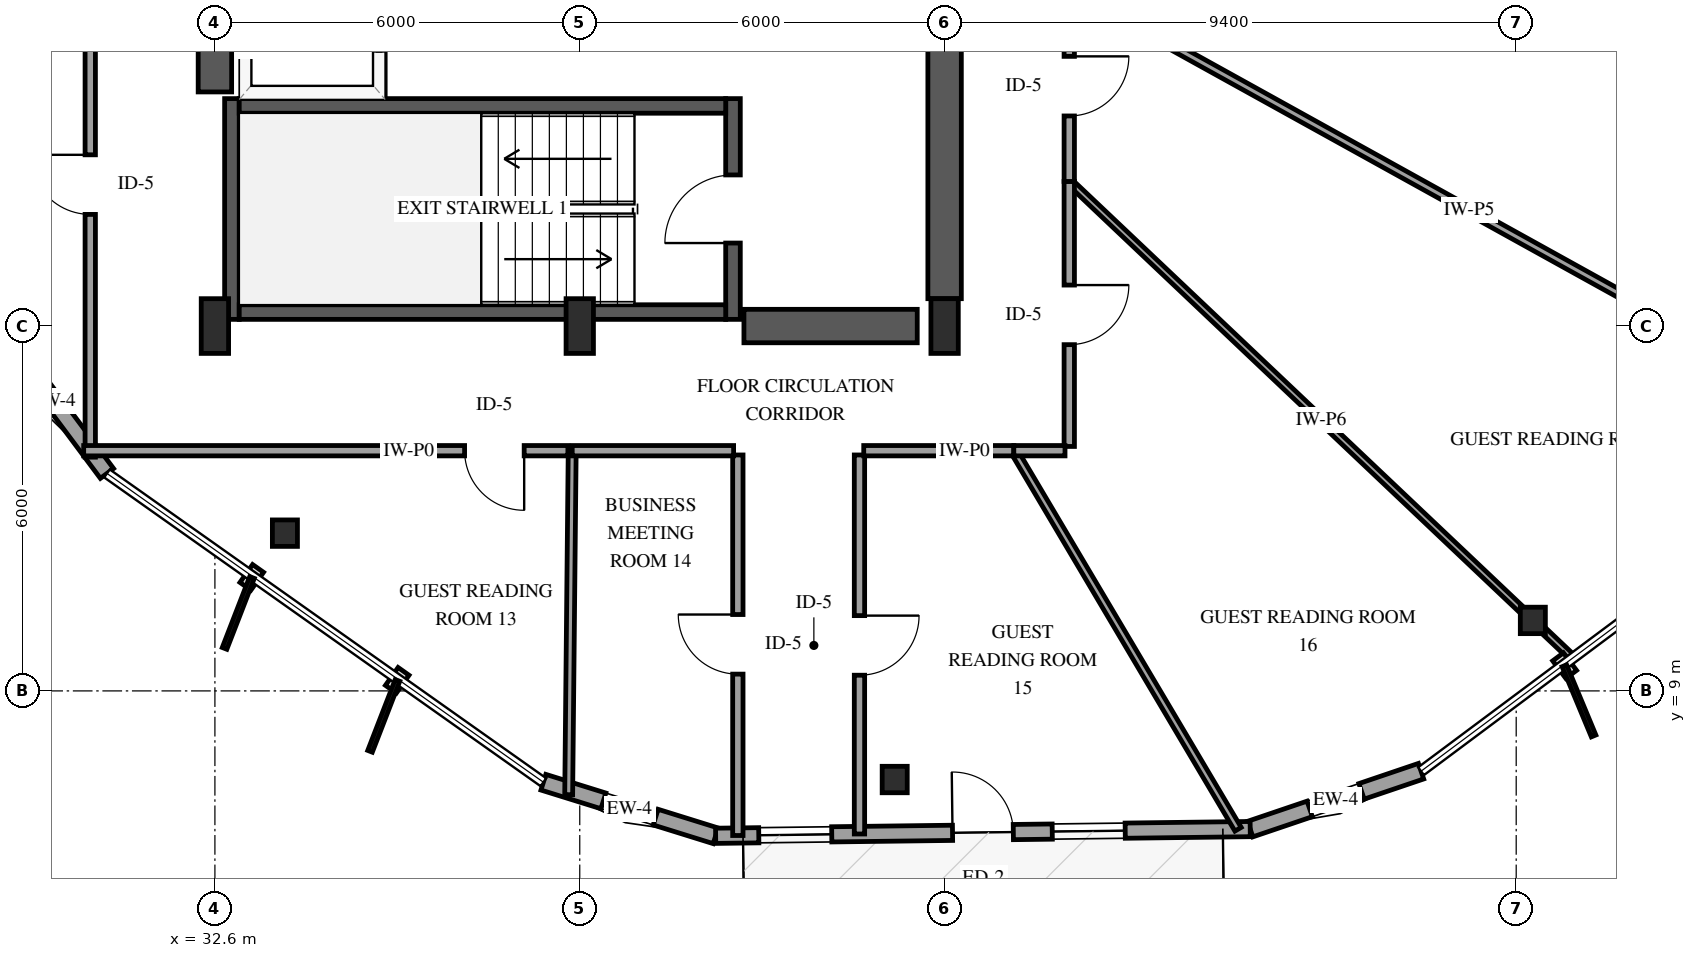
"""IFC4 building model, lengths in metres.
Left out: names, types, materials, properties, quantities, classifications, styles, units other than length and angle.
Written with IfcOpenShell. Run it as: python <this file> out.ifc"""

import sys

from ifc_helpers import new_model, si_unit, direction, frame, frame_2d, origin, origin_2d, place, context, subcontext, project, spatial, rectangle, i_section, extrude, element, fill, save


model = new_model("IFC4")
c1 = context("Model", 3, precision=1e-05, world=origin(), true_north=direction((0.0, 1.0)))
c2 = subcontext(c1, "Body", "Model", "MODEL_VIEW")
j1 = project(units=[si_unit("LENGTHUNIT", "METRE"), si_unit("PLANEANGLEUNIT", "RADIAN")], contexts=[c1])
p1 = place(None, origin())
s1 = spatial("IfcSite", under=j1, at=p1, CompositionType="ELEMENT")
p2 = place(p1, origin())
s2 = spatial("IfcBuilding", under=s1, at=p2, CompositionType="ELEMENT")
p3 = place(p2, frame((0.0, 0.0, 167.8)))
s3 = spatial("IfcBuildingStorey", under=s2, at=p3, CompositionType="ELEMENT", Elevation=167.8)
p4 = place(p3, frame((32.88, 15.11, 0.0), z_axis=(0.0, 0.0, 1.0), x_axis=(0.0, 1.0, 0.0)))
e1 = element("IfcWall", 1, at=p4, inside=s3, PredefinedType="SHEAR", context=c2, shape_type="SweptSolid", body=[
    extrude(rectangle(XDim=3.63, YDim=0.24, at=frame_2d((1.815, 0.0))), origin(), (0.0, 0.0, 1.0), 3.6),
])
p5 = place(p3, frame((41.12, 15.11, 0.0), z_axis=(0.0, 0.0, 1.0), x_axis=(0.0, 1.0, 0.0)))
e2 = element("IfcWall", 2, at=p5, inside=s3, PredefinedType="SHEAR", context=c2, shape_type="SweptSolid", body=[
    extrude(rectangle(XDim=3.63, YDim=0.24, at=frame_2d((1.815, 0.0))), origin(), (0.0, 0.0, 1.0), 3.6),
])
p6 = place(p5, frame((1.255, 0.0, 0.0)))
e3 = element("IfcOpeningElement", 3, at=p6, cuts=e2, PredefinedType="OPENING", context=c2, shape_type="SweptSolid", body=[
    extrude(rectangle(XDim=1.12, YDim=2.15, at=frame_2d((0.56, 1.075))), frame((0.0, 0.13, 0.0), z_axis=(0.0, -1.0, 0.0), x_axis=(1.0, 0.0, 0.0)), (0.0, 0.0, 1.0), 0.26),
])
for number, where, z_axis, x_axis in (
    (4, (33.0, 15.23, 0.0), (0.0, 0.0, 1.0), (1.0, 0.0, 0.0)),
    (5, (33.0, 18.62, 0.0), (0.0, 0.0, 1.0), (1.0, 0.0, 0.0)),
):
    element("IfcWall", number, at=place(p3, frame(where, z_axis=z_axis, x_axis=x_axis)), inside=s3, PredefinedType="SHEAR", context=c2, shape_type="SweptSolid", body=[
        extrude(rectangle(XDim=8.0, YDim=0.24, at=frame_2d((4.0, 0.0))), origin(), (0.0, 0.0, 1.0), 3.6),
    ])
p7 = place(p3, frame((32.6, 18.85, 0.0), z_axis=(0.0, 0.0, 1.0), x_axis=(0.0, 1.0, 0.0)))
e6 = element("IfcWall", 6, at=p7, inside=s3, PredefinedType="SHEAR", context=c2, shape_type="SweptSolid", body=[
    extrude(rectangle(XDim=12.3, YDim=0.55, at=frame_2d((6.15, 0.0))), origin(), (0.0, 0.0, 1.0), 3.6),
])
p8 = place(p3, frame((41.3, 15.0, 0.0), z_axis=(0.0, 0.0, 1.0), x_axis=(1.0, 0.0, 0.0)))
e7 = element("IfcWall", 7, at=p8, inside=s3, PredefinedType="SHEAR", context=c2, shape_type="SweptSolid", body=[
    extrude(rectangle(XDim=2.85, YDim=0.55, at=frame_2d((1.425, 0.0))), origin(), (0.0, 0.0, 1.0), 3.6),
])
p9 = place(p3, frame((44.6, 15.45, 0.0), z_axis=(0.0, 0.0, 1.0), x_axis=(0.0, 1.0, 0.0)))
e8 = element("IfcWall", 8, at=p9, inside=s3, PredefinedType="SHEAR", context=c2, shape_type="SweptSolid", body=[
    extrude(rectangle(XDim=6.35, YDim=0.55, at=frame_2d((3.175, 0.0))), origin(), (0.0, 0.0, 1.0), 3.6),
])
for number, where, z_axis, x_axis in (
    (9, (32.6, 15.0, 0.0), (0.0, 0.0, 1.0), (1.0, 0.0, 0.0)),
    (10, (38.6, 15.0, 0.0), (0.0, 0.0, 1.0), (1.0, 0.0, 0.0)),
    (11, (44.6, 15.0, 0.0), (0.0, 0.0, 1.0), (1.0, 0.0, 0.0)),
):
    element("IfcColumn", number, at=place(p3, frame(where, z_axis=z_axis, x_axis=x_axis)), inside=s3, PredefinedType="PILASTER", context=c2, shape_type="SweptSolid", body=[
        extrude(rectangle(XDim=0.45, YDim=0.9, at=origin_2d()), origin(), (0.0, 0.0, 1.0), 3.6),
    ])
for number, where, z_axis, x_axis in (
    (12, (33.751, 11.594, 0.0), (0.0, 0.0, 1.0), (1.0, 0.0, 0.0)),
    (13, (43.779, 7.542, 0.0), (0.0, 0.0, 1.0), (1.0, 0.0, 0.0)),
    (14, (54.274, 10.159, 0.0), (0.0, 0.0, 1.0), (1.0, 0.0, 0.0)),
):
    element("IfcColumn", number, at=place(p3, frame(where, z_axis=z_axis, x_axis=x_axis)), inside=s3, PredefinedType="COLUMN", context=c2, shape_type="SweptSolid", body=[
        extrude(i_section(OverallWidth=0.412, OverallDepth=0.435, WebThickness=0.036, FlangeThickness=0.057, FilletRadius=0.038, at=origin_2d()), origin(), (0.0, 0.0, 1.0), 3.6),
    ])
p10 = place(p3, frame((29.052, 14.954, 0.0), z_axis=(0.0, 0.0, 1.0), x_axis=(0.597891104192, -0.80157733721, 0.0)))
e15 = element("IfcWall", 15, at=p10, inside=s3, PredefinedType="SOLIDWALL", context=c2, shape_type="SweptSolid", body=[
    extrude(rectangle(XDim=2.967, YDim=0.27, at=frame_2d((1.483, 0.0))), origin(), (0.0, 0.0, 1.0), 2.679),
])
p11 = place(p3, frame((38.002, 7.498, 0.0), z_axis=(0.0, 0.0, 1.0), x_axis=(0.954868707694, -0.29702819911, 0.0)))
e16 = element("IfcWall", 16, at=p11, inside=s3, PredefinedType="SOLIDWALL", context=c2, shape_type="SweptSolid", body=[
    extrude(rectangle(XDim=2.966, YDim=0.27, at=frame_2d((1.483, 0.0))), origin(), (0.0, 0.0, 1.0), 2.679),
])
p12 = place(p11, frame((1.033, 0.0, 0.75)))
e17 = element("IfcOpeningElement", 17, at=p12, cuts=e16, PredefinedType="OPENING", context=c2, shape_type="SweptSolid", body=[
    extrude(rectangle(XDim=0.9, YDim=1.5, at=frame_2d((0.45, 0.75))), frame((0.0, 0.145, 0.0), z_axis=(0.0, -1.0, 0.0), x_axis=(1.0, 0.0, 0.0)), (0.0, 0.0, 1.0), 0.29),
])
p13 = place(p3, frame((49.626, 6.728, 0.0), z_axis=(0.0, 0.0, 1.0), x_axis=(0.947099800271, 0.320939197242, 0.0)))
e18 = element("IfcWall", 18, at=p13, inside=s3, PredefinedType="SOLIDWALL", context=c2, shape_type="SweptSolid", body=[
    extrude(rectangle(XDim=2.967, YDim=0.27, at=frame_2d((1.483, 0.0))), origin(), (0.0, 0.0, 1.0), 2.679),
])
p14 = place(p13, frame((1.033, 0.0, 0.75)))
e19 = element("IfcOpeningElement", 19, at=p14, cuts=e18, PredefinedType="OPENING", context=c2, shape_type="SweptSolid", body=[
    extrude(rectangle(XDim=0.9, YDim=1.5, at=frame_2d((0.45, 0.75))), frame((0.0, 0.145, 0.0), z_axis=(0.0, -1.0, 0.0), x_axis=(1.0, 0.0, 0.0)), (0.0, 0.0, 1.0), 0.29),
])
p15 = place(p3, frame((40.835, 6.617, 0.0), z_axis=(0.0, 0.0, 1.0), x_axis=(0.999921223342, 0.012551777187, 0.0)))
e20 = element("IfcWall", 20, at=p15, inside=s3, PredefinedType="SOLIDWALL", context=c2, shape_type="SweptSolid", body=[
    extrude(rectangle(XDim=8.792, YDim=0.25, at=frame_2d((4.396, 0.0))), origin(), (0.0, 0.0, 1.0), 2.679),
])
p16 = place(p15, frame((3.896, 0.0, 0.0)))
e21 = element("IfcOpeningElement", 21, at=p16, cuts=e20, PredefinedType="OPENING", context=c2, shape_type="SweptSolid", body=[
    extrude(rectangle(XDim=1.0, YDim=2.15, at=frame_2d((0.5, 1.075))), frame((0.0, 0.135, 0.0), z_axis=(0.0, -1.0, 0.0), x_axis=(1.0, 0.0, 0.0)), (0.0, 0.0, 1.0), 0.27),
])
p17 = place(p15, frame((0.709, 0.0, 0.72)))
e22 = element("IfcOpeningElement", 22, at=p17, cuts=e20, PredefinedType="OPENING", context=c2, shape_type="SweptSolid", body=[
    extrude(rectangle(XDim=1.2, YDim=1.6, at=frame_2d((0.6, 0.8))), frame((0.0, 0.135, 0.0), z_axis=(0.0, -1.0, 0.0), x_axis=(1.0, 0.0, 0.0)), (0.0, 0.0, 1.0), 0.27),
])
p18 = place(p15, frame((5.536, 0.0, 0.72)))
e23 = element("IfcOpeningElement", 23, at=p18, cuts=e20, PredefinedType="OPENING", context=c2, shape_type="SweptSolid", body=[
    extrude(rectangle(XDim=1.2, YDim=1.6, at=frame_2d((0.6, 0.8))), frame((0.0, 0.135, 0.0), z_axis=(0.0, -1.0, 0.0), x_axis=(1.0, 0.0, 0.0)), (0.0, 0.0, 1.0), 0.27),
])
p19 = place(p3, frame((35.3, 18.79, 0.0), z_axis=(0.0, 0.0, 1.0), x_axis=(0.0, 1.0, 0.0)))
e24 = element("IfcWall", 24, at=p19, inside=s3, PredefinedType="SOLIDWALL", context=c2, shape_type="SweptSolid", body=[
    extrude(rectangle(XDim=2.55, YDim=0.2, at=frame_2d((1.275, 0.0))), origin(), (0.0, 0.0, 1.0), 3.3),
])
p20 = place(p19, frame((0.725, 0.0, 0.0)))
e25 = element("IfcOpeningElement", 25, at=p20, cuts=e24, PredefinedType="OPENING", context=c2, shape_type="SweptSolid", body=[
    extrude(rectangle(XDim=1.1, YDim=2.15, at=frame_2d((0.55, 1.075))), frame((0.0, 0.11, 0.0), z_axis=(0.0, -1.0, 0.0), x_axis=(1.0, 0.0, 0.0)), (0.0, 0.0, 1.0), 0.22),
])
p21 = place(p3, frame((46.65, 22.668, 0.0), z_axis=(0.0, 0.0, 1.0), x_axis=(0.960487742443, -0.278322289113, 0.0)))
e26 = element("IfcWall", 26, at=p21, inside=s3, PredefinedType="PARTITIONING", context=c2, shape_type="SweptSolid", body=[
    extrude(rectangle(XDim=16.064, YDim=0.1, at=frame_2d((8.032, 0.0))), origin(), (0.0, 0.0, 1.0), 3.3),
])
p22 = place(p3, frame((46.65, 20.542, 0.0), z_axis=(0.0, 0.0, 1.0), x_axis=(0.87479400399, -0.484495047016, 0.0)))
e27 = element("IfcWall", 27, at=p22, inside=s3, PredefinedType="PARTITIONING", context=c2, shape_type="SweptSolid", body=[
    extrude(rectangle(XDim=15.03, YDim=0.13, at=frame_2d((7.515, 0.0))), origin(), (0.0, 0.0, 1.0), 3.3),
])
p23 = place(p3, frame((46.65, 17.378, 0.0), z_axis=(0.0, 0.0, 1.0), x_axis=(0.726147344165, -0.687539114932, 0.0)))
e28 = element("IfcWall", 28, at=p23, inside=s3, PredefinedType="PARTITIONING", context=c2, shape_type="SweptSolid", body=[
    extrude(rectangle(XDim=11.401, YDim=0.11, at=frame_2d((5.701, 0.0))), origin(), (0.0, 0.0, 1.0), 2.595),
])
p24 = place(p3, frame((30.55, 12.844, 0.0), z_axis=(0.0, 0.0, 1.0), x_axis=(0.0, 1.0, 0.0)))
e29 = element("IfcWall", 29, at=p24, inside=s3, PredefinedType="PARTITIONING", context=c2, shape_type="SweptSolid", body=[
    extrude(rectangle(XDim=8.934, YDim=0.17, at=frame_2d((4.467, 0.0))), origin(), (0.0, 0.0, 1.0), 3.3),
])
p25 = place(p24, frame((3.992, 0.0, 0.0)))
e30 = element("IfcOpeningElement", 30, at=p25, cuts=e29, PredefinedType="OPENING", context=c2, shape_type="SweptSolid", body=[
    extrude(rectangle(XDim=0.98, YDim=2.15, at=frame_2d((0.49, 1.075))), frame((0.0, 0.095, 0.0), z_axis=(0.0, -1.0, 0.0), x_axis=(1.0, 0.0, 0.0)), (0.0, 0.0, 1.0), 0.19),
])
p26 = place(p3, frame((38.405, 12.95, 0.0), z_axis=(0.0, 0.0, 1.0), x_axis=(-1.0, 0.0, 0.0)))
e31 = element("IfcWall", 31, at=p26, inside=s3, PredefinedType="PARTITIONING", context=c2, shape_type="SweptSolid", body=[
    extrude(rectangle(XDim=7.963, YDim=0.17, at=frame_2d((3.981, 0.0))), origin(), (0.0, 0.0, 1.0), 3.3),
])
p27 = place(p26, frame((0.719, 0.0, 0.0)))
e32 = element("IfcOpeningElement", 32, at=p27, cuts=e31, PredefinedType="OPENING", context=c2, shape_type="SweptSolid", body=[
    extrude(rectangle(XDim=0.98, YDim=2.15, at=frame_2d((0.49, 1.075))), frame((0.0, 0.095, 0.0), z_axis=(0.0, -1.0, 0.0), x_axis=(1.0, 0.0, 0.0)), (0.0, 0.0, 1.0), 0.19),
])
p28 = place(p3, frame((45.738, 12.95, 0.0), z_axis=(0.0, 0.0, 1.0), x_axis=(0.50971914419, -0.860340859222, 0.0)))
e33 = element("IfcWall", 33, at=p28, inside=s3, PredefinedType="PARTITIONING", context=c2, shape_type="SweptSolid", body=[
    extrude(rectangle(XDim=7.235, YDim=0.12, at=frame_2d((3.618, 0.0))), origin(), (0.0, 0.0, 1.0), 2.678),
])
p29 = place(p3, frame((41.2, 6.622, 0.0), z_axis=(0.0, 0.0, 1.0), x_axis=(0.0, 1.0, 0.0)))
e34 = element("IfcWall", 34, at=p29, inside=s3, PredefinedType="PARTITIONING", context=c2, shape_type="SweptSolid", body=[
    extrude(rectangle(XDim=6.258, YDim=0.17, at=frame_2d((3.129, 0.0))), origin(), (0.0, 0.0, 1.0), 3.3),
])
p30 = place(p29, frame((2.654, 0.0, 0.0)))
e35 = element("IfcOpeningElement", 35, at=p30, cuts=e34, PredefinedType="OPENING", context=c2, shape_type="SweptSolid", body=[
    extrude(rectangle(XDim=0.98, YDim=2.15, at=frame_2d((0.49, 1.075))), frame((0.0, 0.095, 0.0), z_axis=(0.0, -1.0, 0.0), x_axis=(1.0, 0.0, 0.0)), (0.0, 0.0, 1.0), 0.19),
])
p31 = place(p3, frame((43.2, 12.88, 0.0), z_axis=(0.0, 0.0, 1.0), x_axis=(0.0, -1.0, 0.0)))
e36 = element("IfcWall", 36, at=p31, inside=s3, PredefinedType="PARTITIONING", context=c2, shape_type="SweptSolid", body=[
    extrude(rectangle(XDim=6.233, YDim=0.17, at=frame_2d((3.116, 0.0))), origin(), (0.0, 0.0, 1.0), 2.595),
])
p32 = place(p31, frame((2.642, 0.0, 0.0)))
e37 = element("IfcOpeningElement", 37, at=p32, cuts=e36, PredefinedType="OPENING", context=c2, shape_type="SweptSolid", body=[
    extrude(rectangle(XDim=0.98, YDim=2.15, at=frame_2d((0.49, 1.075))), frame((0.0, 0.095, 0.0), z_axis=(0.0, -1.0, 0.0), x_axis=(1.0, 0.0, 0.0)), (0.0, 0.0, 1.0), 0.19),
])
p33 = place(p3, frame((38.475, 12.879, 0.0), z_axis=(0.0, 0.0, 1.0), x_axis=(-0.010226737898, -0.999947705549, 0.0)))
e38 = element("IfcWall", 38, at=p33, inside=s3, PredefinedType="PARTITIONING", context=c2, shape_type="SweptSolid", body=[
    extrude(rectangle(XDim=5.586, YDim=0.13, at=frame_2d((2.793, 0.0))), origin(), (0.0, 0.0, 1.0), 2.678),
])
p34 = place(p3, frame((46.65, 17.378, 0.0), z_axis=(0.0, 0.0, 1.0), x_axis=(0.0, -1.0, 0.0)))
e39 = element("IfcWall", 39, at=p34, inside=s3, PredefinedType="PARTITIONING", context=c2, shape_type="SweptSolid", body=[
    extrude(rectangle(XDim=4.358, YDim=0.17, at=frame_2d((2.179, 0.0))), origin(), (0.0, 0.0, 1.0), 3.3),
])
p35 = place(p34, frame((1.704, 0.0, 0.0)))
e40 = element("IfcOpeningElement", 40, at=p35, cuts=e39, PredefinedType="OPENING", context=c2, shape_type="SweptSolid", body=[
    extrude(rectangle(XDim=0.98, YDim=2.15, at=frame_2d((0.49, 1.075))), frame((0.0, 0.095, 0.0), z_axis=(0.0, -1.0, 0.0), x_axis=(1.0, 0.0, 0.0)), (0.0, 0.0, 1.0), 0.19),
])
p36 = place(p3, frame((46.65, 20.542, 0.0), z_axis=(0.0, 0.0, 1.0), x_axis=(0.0, -1.0, 0.0)))
e41 = element("IfcWall", 41, at=p36, inside=s3, PredefinedType="PARTITIONING", context=c2, shape_type="SweptSolid", body=[
    extrude(rectangle(XDim=3.164, YDim=0.17, at=frame_2d((1.582, 0.0))), origin(), (0.0, 0.0, 1.0), 3.3),
])
p37 = place(p36, frame((1.107, 0.0, 0.0)))
e42 = element("IfcOpeningElement", 42, at=p37, cuts=e41, PredefinedType="OPENING", context=c2, shape_type="SweptSolid", body=[
    extrude(rectangle(XDim=0.98, YDim=2.15, at=frame_2d((0.49, 1.075))), frame((0.0, 0.095, 0.0), z_axis=(0.0, -1.0, 0.0), x_axis=(1.0, 0.0, 0.0)), (0.0, 0.0, 1.0), 0.19),
])
p38 = place(p3, frame((41.13, 12.95, 0.0), z_axis=(0.0, 0.0, 1.0), x_axis=(-1.0, 0.0, 0.0)))
e43 = element("IfcWall", 43, at=p38, inside=s3, PredefinedType="PARTITIONING", context=c2, shape_type="SweptSolid", body=[
    extrude(rectangle(XDim=2.654, YDim=0.17, at=frame_2d((1.327, 0.0))), origin(), (0.0, 0.0, 1.0), 3.3),
])
p39 = place(p3, frame((45.738, 12.95, 0.0), z_axis=(0.0, 0.0, 1.0), x_axis=(-1.0, 0.0, 0.0)))
e44 = element("IfcWall", 44, at=p39, inside=s3, PredefinedType="PARTITIONING", context=c2, shape_type="SweptSolid", body=[
    extrude(rectangle(XDim=2.468, YDim=0.17, at=frame_2d((1.234, 0.0))), origin(), (0.0, 0.0, 1.0), 3.3),
])
p40 = place(p3, frame((46.58, 12.95, 0.0), z_axis=(0.0, 0.0, 1.0), x_axis=(-1.0, 0.0, 0.0)))
e45 = element("IfcWall", 45, at=p40, inside=s3, PredefinedType="PARTITIONING", context=c2, shape_type="SweptSolid", body=[
    extrude(rectangle(XDim=0.842, YDim=0.17, at=frame_2d((0.421, 0.0))), origin(), (0.0, 0.0, 1.0), 3.3),
])
p41 = place(p12, origin())
e46 = element("IfcWindow", 46, at=p41, inside=s3, PartitioningType="SINGLE_PANEL", PredefinedType="WINDOW", context=c2, shape_type="SweptSolid", body=[
    extrude(rectangle(XDim=0.9, YDim=1.5, at=frame_2d((0.45, 0.75))), frame((0.0, 0.03, 0.0), z_axis=(0.0, -1.0, 0.0), x_axis=(1.0, 0.0, 0.0)), (0.0, 0.0, 1.0), 0.06),
])
fill(e17, e46)
p42 = place(p14, origin())
e47 = element("IfcWindow", 47, at=p42, inside=s3, PartitioningType="SINGLE_PANEL", PredefinedType="WINDOW", context=c2, shape_type="SweptSolid", body=[
    extrude(rectangle(XDim=0.9, YDim=1.5, at=frame_2d((0.45, 0.75))), frame((0.0, 0.03, 0.0), z_axis=(0.0, -1.0, 0.0), x_axis=(1.0, 0.0, 0.0)), (0.0, 0.0, 1.0), 0.06),
])
fill(e19, e47)
p43 = place(p16, origin())
e48 = element("IfcDoor", 48, at=p43, inside=s3, OperationType="SINGLE_SWING_LEFT", PredefinedType="DOOR", context=c2, shape_type="SweptSolid", body=[
    extrude(rectangle(XDim=1.0, YDim=2.15, at=frame_2d((0.5, 1.075))), frame((0.0, 0.025, 0.0), z_axis=(0.0, -1.0, 0.0), x_axis=(1.0, 0.0, 0.0)), (0.0, 0.0, 1.0), 0.05),
])
fill(e21, e48)
p44 = place(p17, origin())
e49 = element("IfcWindow", 49, at=p44, inside=s3, PartitioningType="SINGLE_PANEL", PredefinedType="WINDOW", context=c2, shape_type="SweptSolid", body=[
    extrude(rectangle(XDim=1.2, YDim=1.6, at=frame_2d((0.6, 0.8))), frame((0.0, 0.03, 0.0), z_axis=(0.0, -1.0, 0.0), x_axis=(1.0, 0.0, 0.0)), (0.0, 0.0, 1.0), 0.06),
])
fill(e22, e49)
p45 = place(p18, origin())
e50 = element("IfcWindow", 50, at=p45, inside=s3, PartitioningType="SINGLE_PANEL", PredefinedType="WINDOW", context=c2, shape_type="SweptSolid", body=[
    extrude(rectangle(XDim=1.2, YDim=1.6, at=frame_2d((0.6, 0.8))), frame((0.0, 0.03, 0.0), z_axis=(0.0, -1.0, 0.0), x_axis=(1.0, 0.0, 0.0)), (0.0, 0.0, 1.0), 0.06),
])
fill(e23, e50)
p46 = place(p6, origin())
e51 = element("IfcDoor", 51, at=p46, inside=s3, OperationType="SINGLE_SWING_LEFT", PredefinedType="DOOR", context=c2, shape_type="SweptSolid", body=[
    extrude(rectangle(XDim=1.12, YDim=2.15, at=frame_2d((0.56, 1.075))), frame((0.0, 0.025, 0.0), z_axis=(0.0, -1.0, 0.0), x_axis=(1.0, 0.0, 0.0)), (0.0, 0.0, 1.0), 0.05),
])
fill(e3, e51)
p47 = place(p25, origin())
e52 = element("IfcDoor", 52, at=p47, inside=s3, OperationType="SINGLE_SWING_RIGHT", PredefinedType="DOOR", context=c2, shape_type="SweptSolid", body=[
    extrude(rectangle(XDim=0.98, YDim=2.15, at=frame_2d((0.49, 1.075))), frame((0.0, 0.025, 0.0), z_axis=(0.0, -1.0, 0.0), x_axis=(1.0, 0.0, 0.0)), (0.0, 0.0, 1.0), 0.05),
])
fill(e30, e52)
p48 = place(p27, origin())
e53 = element("IfcDoor", 53, at=p48, inside=s3, OperationType="SINGLE_SWING_LEFT", PredefinedType="DOOR", context=c2, shape_type="SweptSolid", body=[
    extrude(rectangle(XDim=0.98, YDim=2.15, at=frame_2d((0.49, 1.075))), frame((0.0, 0.025, 0.0), z_axis=(0.0, -1.0, 0.0), x_axis=(1.0, 0.0, 0.0)), (0.0, 0.0, 1.0), 0.05),
])
fill(e32, e53)
p49 = place(p30, origin())
e54 = element("IfcDoor", 54, at=p49, inside=s3, OperationType="SINGLE_SWING_RIGHT", PredefinedType="DOOR", context=c2, shape_type="SweptSolid", body=[
    extrude(rectangle(XDim=0.98, YDim=2.15, at=frame_2d((0.49, 1.075))), frame((0.0, 0.025, 0.0), z_axis=(0.0, -1.0, 0.0), x_axis=(1.0, 0.0, 0.0)), (0.0, 0.0, 1.0), 0.05),
])
fill(e35, e54)
p50 = place(p32, origin())
e55 = element("IfcDoor", 55, at=p50, inside=s3, OperationType="SINGLE_SWING_LEFT", PredefinedType="DOOR", context=c2, shape_type="SweptSolid", body=[
    extrude(rectangle(XDim=0.98, YDim=2.15, at=frame_2d((0.49, 1.075))), frame((0.0, 0.025, 0.0), z_axis=(0.0, -1.0, 0.0), x_axis=(1.0, 0.0, 0.0)), (0.0, 0.0, 1.0), 0.05),
])
fill(e37, e55)
p51 = place(p35, origin())
e56 = element("IfcDoor", 56, at=p51, inside=s3, OperationType="SINGLE_SWING_LEFT", PredefinedType="DOOR", context=c2, shape_type="SweptSolid", body=[
    extrude(rectangle(XDim=0.98, YDim=2.15, at=frame_2d((0.49, 1.075))), frame((0.0, 0.025, 0.0), z_axis=(0.0, -1.0, 0.0), x_axis=(1.0, 0.0, 0.0)), (0.0, 0.0, 1.0), 0.05),
])
fill(e40, e56)
p52 = place(p37, origin())
e57 = element("IfcDoor", 57, at=p52, inside=s3, OperationType="SINGLE_SWING_LEFT", PredefinedType="DOOR", context=c2, shape_type="SweptSolid", body=[
    extrude(rectangle(XDim=0.98, YDim=2.15, at=frame_2d((0.49, 1.075))), frame((0.0, 0.025, 0.0), z_axis=(0.0, -1.0, 0.0), x_axis=(1.0, 0.0, 0.0)), (0.0, 0.0, 1.0), 0.05),
])
fill(e42, e57)
save(model, sys.argv[1])
